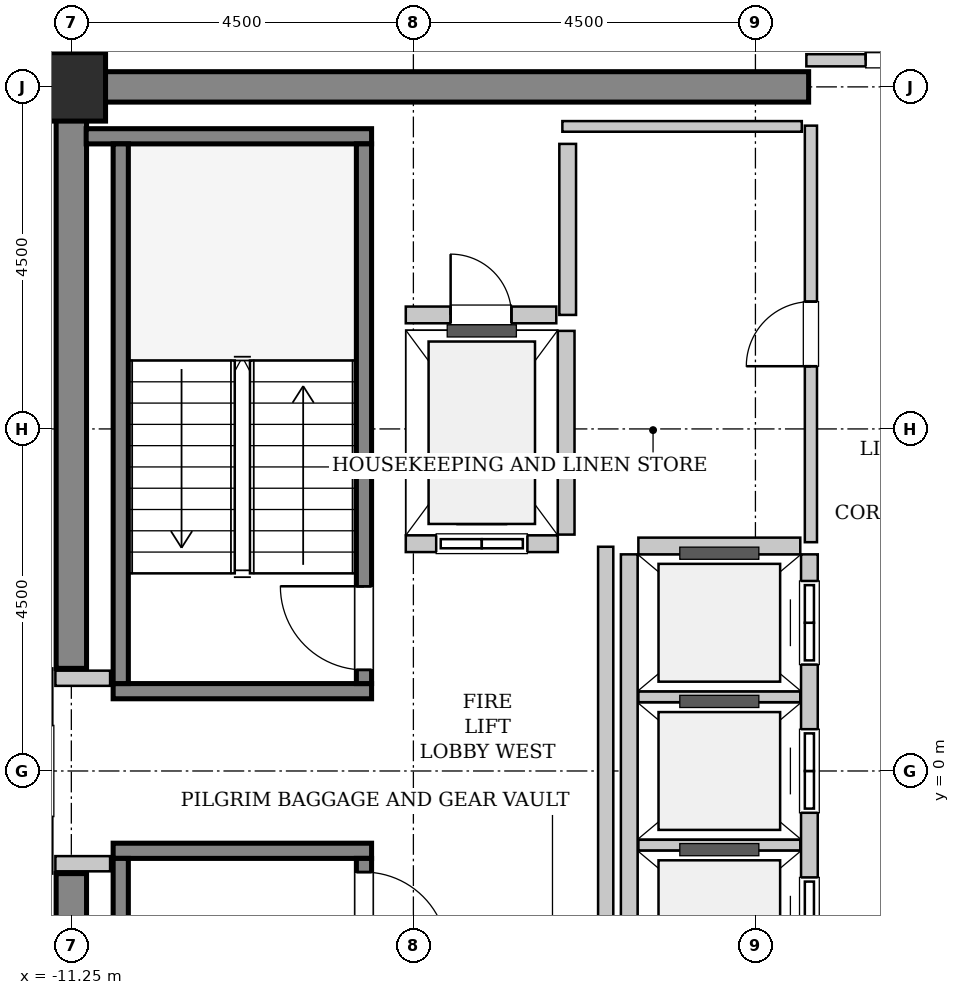
"""IFC4 building model, lengths in metres.
Left out: names, types, materials, properties, quantities, classifications, styles, units other than length and angle.
Written with IfcOpenShell. Run it as: python <this file> out.ifc"""

import sys

from ifc_helpers import new_model, si_unit, direction, frame, frame_2d, origin, origin_2d, place, context, subcontext, project, spatial, rectangle, extrude, source, transform, mapped, element, fill, save


model = new_model("IFC4")
c1 = context("Model", 3, precision=1e-05, world=origin(), true_north=direction((0.0, 1.0)))
c2 = subcontext(c1, "Body", "Model", "MODEL_VIEW")
j1 = project(units=[si_unit("LENGTHUNIT", "METRE"), si_unit("PLANEANGLEUNIT", "RADIAN")], contexts=[c1])
p1 = place(None, origin())
s1 = spatial("IfcSite", under=j1, at=p1, CompositionType="ELEMENT")
p2 = place(p1, origin())
s2 = spatial("IfcBuilding", under=s1, at=p2, CompositionType="ELEMENT")
p3 = place(p2, frame((0.0, 0.0, 341.4)))
s3 = spatial("IfcBuildingStorey", under=s2, at=p3, CompositionType="ELEMENT", Elevation=341.4)
m1 = source(origin(), c2, "Body", "SweptSolid", [
    extrude(rectangle(XDim=9.9, YDim=0.4, at=frame_2d((4.95, 0.0))), origin(), (0.0, 0.0, 1.0), 3.8),
])
p4 = place(p3, frame((-11.45, 9.0, 0.0), z_axis=(0.0, 0.0, 1.0), x_axis=(1.0, 0.0, 0.0)))
e1 = element("IfcWall", 1, at=p4, inside=s3, PredefinedType="SHEAR", context=c2, shape_type="MappedRepresentation", body=[
    mapped(m1, transform((0.0, 0.0, 0.0), x_axis=(1.0, 0.0, 0.0), y_axis=(0.0, 1.0, 0.0), z_axis=(0.0, 0.0, 1.0), scale=1.0)),
])
m2 = source(origin(), c2, "Body", "SweptSolid", [
    extrude(rectangle(XDim=7.45, YDim=0.4, at=frame_2d((3.725, 0.0))), origin(), (0.0, 0.0, 1.0), 3.8),
])
for number, where, z_axis, x_axis in (
    (2, (-11.25, -8.8, 0.0), (0.0, 0.0, 1.0), (0.0, 1.0, 0.0)),
    (3, (-11.25, 1.35, 0.0), (0.0, 0.0, 1.0), (0.0, 1.0, 0.0)),
):
    element("IfcWall", number, at=place(p3, frame(where, z_axis=z_axis, x_axis=x_axis)), inside=s3, PredefinedType="SHEAR", context=c2, shape_type="MappedRepresentation", body=[
        mapped(m2, transform((0.0, 0.0, 0.0), x_axis=(1.0, 0.0, 0.0), y_axis=(0.0, 1.0, 0.0), z_axis=(0.0, 0.0, 1.0), scale=1.0)),
    ])
m3 = source(origin(), c2, "Body", "SweptSolid", [
    extrude(rectangle(XDim=0.9, YDim=0.9, at=origin_2d()), origin(), (0.0, 0.0, 1.0), 3.8),
])
p5 = place(p3, frame((-11.25, 9.0, 0.0), z_axis=(0.0, 0.0, 1.0), x_axis=(1.0, 0.0, 0.0)))
e4 = element("IfcColumn", 4, at=p5, inside=s3, PredefinedType="COLUMN", context=c2, shape_type="MappedRepresentation", body=[
    mapped(m3, transform((0.0, 0.0, 0.0), x_axis=(1.0, 0.0, 0.0), y_axis=(0.0, 1.0, 0.0), z_axis=(0.0, 0.0, 1.0), scale=1.0)),
])
m4 = source(origin(), c2, "Body", "SweptSolid", [
    extrude(rectangle(XDim=3.4, YDim=0.2, at=frame_2d((1.7, 0.0))), origin(), (0.0, 0.0, 1.0), 3.8),
])
p6 = place(p3, frame((-7.3, 1.05, 0.0), z_axis=(0.0, 0.0, 1.0), x_axis=(-1.0, 0.0, 0.0)))
e5 = element("IfcWall", 5, at=p6, inside=s3, PredefinedType="SOLIDWALL", context=c2, shape_type="MappedRepresentation", body=[
    mapped(m4, transform((0.0, 0.0, 0.0), x_axis=(1.0, 0.0, 0.0), y_axis=(0.0, 1.0, 0.0), z_axis=(0.0, 0.0, 1.0), scale=1.0)),
])
m5 = source(origin(), c2, "Body", "SweptSolid", [
    extrude(rectangle(XDim=3.755, YDim=0.2, at=frame_2d((1.877, 0.0))), origin(), (0.0, 0.0, 1.0), 3.8),
])
p7 = place(p3, frame((-7.3, 8.35, 0.0), z_axis=(0.0, 0.0, 1.0), x_axis=(-1.0, 0.0, 0.0)))
e6 = element("IfcWall", 6, at=p7, inside=s3, PredefinedType="SOLIDWALL", context=c2, shape_type="MappedRepresentation", body=[
    mapped(m5, transform((0.0, 0.0, 0.0), x_axis=(1.0, 0.0, 0.0), y_axis=(0.0, 1.0, 0.0), z_axis=(0.0, 0.0, 1.0), scale=1.0)),
])
m6 = source(origin(), c2, "Body", "SweptSolid", [
    extrude(rectangle(XDim=7.1, YDim=0.2, at=frame_2d((3.55, 0.0))), origin(), (0.0, 0.0, 1.0), 3.8),
])
p8 = place(p3, frame((-7.4, 1.15, 0.0), z_axis=(0.0, 0.0, 1.0), x_axis=(0.0, 1.0, 0.0)))
e7 = element("IfcWall", 7, at=p8, inside=s3, PredefinedType="SOLIDWALL", context=c2, shape_type="MappedRepresentation", body=[
    mapped(m6, transform((0.0, 0.0, 0.0), x_axis=(1.0, 0.0, 0.0), y_axis=(0.0, 1.0, 0.0), z_axis=(0.0, 0.0, 1.0), scale=1.0)),
])
p9 = place(p8, frame((0.18, 0.0, 0.0)))
e8 = element("IfcOpeningElement", 8, at=p9, cuts=e7, PredefinedType="OPENING", context=c2, shape_type="SweptSolid", body=[
    extrude(rectangle(XDim=1.1, YDim=2.15, at=frame_2d((0.55, 1.075))), frame((0.0, 0.11, 0.0), z_axis=(0.0, -1.0, 0.0), x_axis=(1.0, 0.0, 0.0)), (0.0, 0.0, 1.0), 0.22),
])
p10 = place(p3, frame((-10.6, 1.15, 0.0), z_axis=(0.0, 0.0, 1.0), x_axis=(0.0, 1.0, 0.0)))
e9 = element("IfcWall", 9, at=p10, inside=s3, PredefinedType="SOLIDWALL", context=c2, shape_type="MappedRepresentation", body=[
    mapped(m6, transform((0.0, 0.0, 0.0), x_axis=(1.0, 0.0, 0.0), y_axis=(0.0, 1.0, 0.0), z_axis=(0.0, 0.0, 1.0), scale=1.0)),
])
p11 = place(p3, frame((-10.7, -1.05, 0.0), z_axis=(0.0, 0.0, 1.0), x_axis=(1.0, 0.0, 0.0)))
e10 = element("IfcWall", 10, at=p11, inside=s3, PredefinedType="SOLIDWALL", context=c2, shape_type="MappedRepresentation", body=[
    mapped(m4, transform((0.0, 0.0, 0.0), x_axis=(1.0, 0.0, 0.0), y_axis=(0.0, 1.0, 0.0), z_axis=(0.0, 0.0, 1.0), scale=1.0)),
])
p12 = place(p3, frame((-10.6, -1.15, 0.0), z_axis=(0.0, 0.0, 1.0), x_axis=(0.0, -1.0, 0.0)))
e11 = element("IfcWall", 11, at=p12, inside=s3, PredefinedType="SOLIDWALL", context=c2, shape_type="MappedRepresentation", body=[
    mapped(m6, transform((0.0, 0.0, 0.0), x_axis=(1.0, 0.0, 0.0), y_axis=(0.0, 1.0, 0.0), z_axis=(0.0, 0.0, 1.0), scale=1.0)),
])
p13 = place(p3, frame((-7.4, -1.15, 0.0), z_axis=(0.0, 0.0, 1.0), x_axis=(0.0, -1.0, 0.0)))
e12 = element("IfcWall", 12, at=p13, inside=s3, PredefinedType="SOLIDWALL", context=c2, shape_type="MappedRepresentation", body=[
    mapped(m6, transform((0.0, 0.0, 0.0), x_axis=(1.0, 0.0, 0.0), y_axis=(0.0, 1.0, 0.0), z_axis=(0.0, 0.0, 1.0), scale=1.0)),
])
p14 = place(p13, frame((0.18, 0.0, 0.0)))
e13 = element("IfcOpeningElement", 13, at=p14, cuts=e12, PredefinedType="OPENING", context=c2, shape_type="SweptSolid", body=[
    extrude(rectangle(XDim=1.1, YDim=2.15, at=frame_2d((0.55, 1.075))), frame((0.0, 0.11, 0.0), z_axis=(0.0, -1.0, 0.0), x_axis=(1.0, 0.0, 0.0)), (0.0, 0.0, 1.0), 0.22),
])
m7 = source(origin(), c2, "Body", "SweptSolid", [
    extrude(rectangle(XDim=2.0, YDim=0.22, at=frame_2d((1.0, 0.0))), origin(), (0.0, 0.0, 1.0), 3.535),
])
p15 = place(p3, frame((-6.85, 2.99, 0.0), z_axis=(0.0, 0.0, 1.0), x_axis=(1.0, 0.0, 0.0)))
e14 = element("IfcWall", 14, at=p15, inside=s3, PredefinedType="SOLIDWALL", context=c2, shape_type="MappedRepresentation", body=[
    mapped(m7, transform((0.0, 0.0, 0.0), x_axis=(1.0, 0.0, 0.0), y_axis=(0.0, 1.0, 0.0), z_axis=(0.0, 0.0, 1.0), scale=1.0)),
])
p16 = place(p15, frame((0.4, 0.0, 0.0)))
e15 = element("IfcOpeningElement", 15, at=p16, cuts=e14, PredefinedType="OPENING", context=c2, shape_type="SweptSolid", body=[
    extrude(rectangle(XDim=1.2, YDim=2.2, at=frame_2d((0.6, 1.1))), frame((0.0, 0.12, 0.0), z_axis=(0.0, -1.0, 0.0), x_axis=(1.0, 0.0, 0.0)), (0.0, 0.0, 1.0), 0.24),
])
m8 = source(origin(), c2, "Body", "SweptSolid", [
    extrude(rectangle(XDim=2.68, YDim=0.22, at=frame_2d((1.34, 0.0))), origin(), (0.0, 0.0, 1.0), 3.535),
])
p17 = place(p3, frame((-4.74, 3.11, 0.0), z_axis=(0.0, 0.0, 1.0), x_axis=(0.0, 1.0, 0.0)))
e16 = element("IfcWall", 16, at=p17, inside=s3, PredefinedType="SOLIDWALL", context=c2, shape_type="MappedRepresentation", body=[
    mapped(m8, transform((0.0, 0.0, 0.0), x_axis=(1.0, 0.0, 0.0), y_axis=(0.0, 1.0, 0.0), z_axis=(0.0, 0.0, 1.0), scale=1.0)),
])
m9 = source(origin(), c2, "Body", "SweptSolid", [
    extrude(rectangle(XDim=5.7, YDim=0.22, at=frame_2d((2.85, 0.0))), origin(), (0.0, 0.0, 1.0), 3.535),
])
p18 = place(p3, frame((-1.54, -2.85, 0.0), z_axis=(0.0, 0.0, 1.0), x_axis=(0.0, 1.0, 0.0)))
e17 = element("IfcWall", 17, at=p18, inside=s3, PredefinedType="SOLIDWALL", context=c2, shape_type="MappedRepresentation", body=[
    mapped(m9, transform((0.0, 0.0, 0.0), x_axis=(1.0, 0.0, 0.0), y_axis=(0.0, 1.0, 0.0), z_axis=(0.0, 0.0, 1.0), scale=1.0)),
])
p19 = place(p18, frame((0.35, 0.0, 0.0)))
e18 = element("IfcOpeningElement", 18, at=p19, cuts=e17, PredefinedType="OPENING", context=c2, shape_type="SweptSolid", body=[
    extrude(rectangle(XDim=1.1, YDim=2.2, at=frame_2d((0.55, 1.1))), frame((0.0, 0.12, 0.0), z_axis=(0.0, -1.0, 0.0), x_axis=(1.0, 0.0, 0.0)), (0.0, 0.0, 1.0), 0.24),
])
p20 = place(p18, frame((2.3, 0.0, 0.0)))
e19 = element("IfcOpeningElement", 19, at=p20, cuts=e17, PredefinedType="OPENING", context=c2, shape_type="SweptSolid", body=[
    extrude(rectangle(XDim=1.1, YDim=2.2, at=frame_2d((0.55, 1.1))), frame((0.0, 0.12, 0.0), z_axis=(0.0, -1.0, 0.0), x_axis=(1.0, 0.0, 0.0)), (0.0, 0.0, 1.0), 0.24),
])
p21 = place(p18, frame((4.25, 0.0, 0.0)))
e20 = element("IfcOpeningElement", 20, at=p21, cuts=e17, PredefinedType="OPENING", context=c2, shape_type="SweptSolid", body=[
    extrude(rectangle(XDim=1.1, YDim=2.2, at=frame_2d((0.55, 1.1))), frame((0.0, 0.12, 0.0), z_axis=(0.0, -1.0, 0.0), x_axis=(1.0, 0.0, 0.0)), (0.0, 0.0, 1.0), 0.24),
])
p22 = place(p3, frame((-3.91, 2.85, 0.0), z_axis=(0.0, 0.0, 1.0), x_axis=(0.0, -1.0, 0.0)))
e21 = element("IfcWall", 21, at=p22, inside=s3, PredefinedType="SOLIDWALL", context=c2, shape_type="MappedRepresentation", body=[
    mapped(m9, transform((0.0, 0.0, 0.0), x_axis=(1.0, 0.0, 0.0), y_axis=(0.0, 1.0, 0.0), z_axis=(0.0, 0.0, 1.0), scale=1.0)),
])
m10 = source(origin(), c2, "Body", "SweptSolid", [
    extrude(rectangle(XDim=2.13, YDim=0.14, at=frame_2d((1.065, 0.0))), origin(), (0.0, 0.0, 1.0), 3.535),
])
for number, where, z_axis, x_axis in (
    (22, (-3.79, -0.975, 0.0), (0.0, 0.0, 1.0), (1.0, 0.0, 0.0)),
    (23, (-3.79, 0.975, 0.0), (0.0, 0.0, 1.0), (1.0, 0.0, 0.0)),
):
    element("IfcWall", number, at=place(p3, frame(where, z_axis=z_axis, x_axis=x_axis)), inside=s3, PredefinedType="PARTITIONING", context=c2, shape_type="MappedRepresentation", body=[
        mapped(m10, transform((0.0, 0.0, 0.0), x_axis=(1.0, 0.0, 0.0), y_axis=(0.0, 1.0, 0.0), z_axis=(0.0, 0.0, 1.0), scale=1.0)),
    ])
m11 = source(origin(), c2, "Body", "SweptSolid", [
    extrude(rectangle(XDim=2.13, YDim=0.22, at=frame_2d((1.065, 0.0))), origin(), (0.0, 0.0, 1.0), 3.535),
])
p23 = place(p3, frame((-1.66, 2.96, 0.0), z_axis=(0.0, 0.0, 1.0), x_axis=(-1.0, 0.0, 0.0)))
e24 = element("IfcWall", 24, at=p23, inside=s3, PredefinedType="SOLIDWALL", context=c2, shape_type="MappedRepresentation", body=[
    mapped(m11, transform((0.0, 0.0, 0.0), x_axis=(1.0, 0.0, 0.0), y_axis=(0.0, 1.0, 0.0), z_axis=(0.0, 0.0, 1.0), scale=1.0)),
])
m12 = source(origin(), c2, "Body", "SweptSolid", [
    extrude(rectangle(XDim=2.25, YDim=0.22, at=frame_2d((1.125, 0.0))), origin(), (0.0, 0.0, 1.0), 3.535),
])
p24 = place(p3, frame((-4.72, 6.0, 0.0), z_axis=(0.0, 0.0, 1.0), x_axis=(0.0, 1.0, 0.0)))
e25 = element("IfcWall", 25, at=p24, inside=s3, PredefinedType="SOLIDWALL", context=c2, shape_type="MappedRepresentation", body=[
    mapped(m12, transform((0.0, 0.0, 0.0), x_axis=(1.0, 0.0, 0.0), y_axis=(0.0, 1.0, 0.0), z_axis=(0.0, 0.0, 1.0), scale=1.0)),
])
m13 = source(origin(), c2, "Body", "SweptSolid", [
    extrude(rectangle(XDim=1.98, YDim=0.22, at=frame_2d((0.99, 0.0))), origin(), (0.0, 0.0, 1.0), 3.535),
])
p25 = place(p3, frame((-6.85, 6.0, 0.0), z_axis=(0.0, 0.0, 1.0), x_axis=(1.0, 0.0, 0.0)))
e26 = element("IfcWall", 26, at=p25, inside=s3, PredefinedType="SOLIDWALL", context=c2, shape_type="MappedRepresentation", body=[
    mapped(m13, transform((0.0, 0.0, 0.0), x_axis=(1.0, 0.0, 0.0), y_axis=(0.0, 1.0, 0.0), z_axis=(0.0, 0.0, 1.0), scale=1.0)),
])
p26 = place(p25, frame((0.59, 0.0, 0.0)))
e27 = element("IfcOpeningElement", 27, at=p26, cuts=e26, PredefinedType="OPENING", context=c2, shape_type="SweptSolid", body=[
    extrude(rectangle(XDim=0.8, YDim=2.0, at=frame_2d((0.4, 1.0))), frame((0.0, 0.12, 0.0), z_axis=(0.0, -1.0, 0.0), x_axis=(1.0, 0.0, 0.0)), (0.0, 0.0, 1.0), 0.24),
])
m14 = source(origin(), c2, "Body", "SweptSolid", [
    extrude(rectangle(XDim=5.9, YDim=0.2, at=frame_2d((2.95, 0.0))), origin(), (0.0, 0.0, 1.0), 3.535),
])
p27 = place(p3, frame((-4.22, -2.95, 0.0), z_axis=(0.0, 0.0, 1.0), x_axis=(0.0, 1.0, 0.0)))
e28 = element("IfcWall", 28, at=p27, inside=s3, PredefinedType="PARTITIONING", context=c2, shape_type="MappedRepresentation", body=[
    mapped(m14, transform((0.0, 0.0, 0.0), x_axis=(1.0, 0.0, 0.0), y_axis=(0.0, 1.0, 0.0), z_axis=(0.0, 0.0, 1.0), scale=1.0)),
])
m15 = source(origin(), c2, "Body", "SweptSolid", [
    extrude(rectangle(XDim=0.72, YDim=0.2, at=frame_2d((0.36, 0.0))), origin(), (0.0, 0.0, 1.0), 3.535),
])
for number, where, z_axis, x_axis in (
    (29, (-11.46, 1.22, 0.0), (0.0, 0.0, 1.0), (1.0, 0.0, 0.0)),
    (30, (-11.46, -1.22, 0.0), (0.0, 0.0, 1.0), (1.0, 0.0, 0.0)),
):
    element("IfcWall", number, at=place(p3, frame(where, z_axis=z_axis, x_axis=x_axis)), inside=s3, PredefinedType="PARTITIONING", context=c2, shape_type="MappedRepresentation", body=[
        mapped(m15, transform((0.0, 0.0, 0.0), x_axis=(1.0, 0.0, 0.0), y_axis=(0.0, 1.0, 0.0), z_axis=(0.0, 0.0, 1.0), scale=1.0)),
    ])
m16 = source(origin(), c2, "Body", "SweptSolid", [
    extrude(rectangle(XDim=3.16, YDim=0.16, at=frame_2d((1.58, 0.0))), origin(), (0.0, 0.0, 1.0), 2.625),
])
p28 = place(p3, frame((-1.58, 9.35, 0.0), z_axis=(0.0, 0.0, 1.0), x_axis=(1.0, 0.0, 0.0)))
e31 = element("IfcWall", 31, at=p28, inside=s3, PredefinedType="PARTITIONING", context=c2, shape_type="MappedRepresentation", body=[
    mapped(m16, transform((0.0, 0.0, 0.0), x_axis=(1.0, 0.0, 0.0), y_axis=(0.0, 1.0, 0.0), z_axis=(0.0, 0.0, 1.0), scale=1.0)),
])
p29 = place(p28, frame((0.78, 0.0, 0.0)))
e32 = element("IfcOpeningElement", 32, at=p29, cuts=e31, PredefinedType="OPENING", context=c2, shape_type="SweptSolid", body=[
    extrude(rectangle(XDim=1.6, YDim=2.3, at=frame_2d((0.8, 1.15))), frame((0.0, 0.09, 0.0), z_axis=(0.0, -1.0, 0.0), x_axis=(1.0, 0.0, 0.0)), (0.0, 0.0, 1.0), 0.18),
])
m17 = source(origin(), c2, "Body", "SweptSolid", [
    extrude(rectangle(XDim=5.48, YDim=0.16, at=frame_2d((2.74, 0.0))), origin(), (0.0, 0.0, 1.0), 3.535),
])
p30 = place(p3, frame((-1.52, 3.01, 0.0), z_axis=(0.0, 0.0, 1.0), x_axis=(0.0, 1.0, 0.0)))
e33 = element("IfcWall", 33, at=p30, inside=s3, PredefinedType="PARTITIONING", context=c2, shape_type="MappedRepresentation", body=[
    mapped(m17, transform((0.0, 0.0, 0.0), x_axis=(1.0, 0.0, 0.0), y_axis=(0.0, 1.0, 0.0), z_axis=(0.0, 0.0, 1.0), scale=1.0)),
])
p31 = place(p30, frame((2.315, 0.0, 0.0)))
e34 = element("IfcOpeningElement", 34, at=p31, cuts=e33, PredefinedType="OPENING", context=c2, shape_type="SweptSolid", body=[
    extrude(rectangle(XDim=0.85, YDim=2.1, at=frame_2d((0.425, 1.05))), frame((0.0, 0.09, 0.0), z_axis=(0.0, -1.0, 0.0), x_axis=(1.0, 0.0, 0.0)), (0.0, 0.0, 1.0), 0.18),
])
m18 = source(origin(), c2, "Body", "SweptSolid", [
    extrude(rectangle(XDim=3.15, YDim=0.14, at=frame_2d((1.575, 0.0))), origin(), (0.0, 0.0, 1.0), 3.535),
])
p32 = place(p3, frame((-4.79, 8.48, 0.0), z_axis=(0.0, 0.0, 1.0), x_axis=(1.0, 0.0, 0.0)))
e35 = element("IfcWall", 35, at=p32, inside=s3, PredefinedType="PARTITIONING", context=c2, shape_type="MappedRepresentation", body=[
    mapped(m18, transform((0.0, 0.0, 0.0), x_axis=(1.0, 0.0, 0.0), y_axis=(0.0, 1.0, 0.0), z_axis=(0.0, 0.0, 1.0), scale=1.0)),
])
m19 = source(origin(), c2, "Body", "SweptSolid", [
    extrude(rectangle(XDim=1.1, YDim=2.15, at=frame_2d((0.55, 1.075))), frame((0.0, 0.025, 0.0), z_axis=(0.0, -1.0, 0.0), x_axis=(1.0, 0.0, 0.0)), (0.0, 0.0, 1.0), 0.05),
])
p33 = place(p9, origin())
e36 = element("IfcDoor", 36, at=p33, inside=s3, OperationType="SINGLE_SWING_RIGHT", PredefinedType="DOOR", context=c2, shape_type="MappedRepresentation", body=[
    mapped(m19, transform((0.0, 0.0, 0.0), x_axis=(1.0, 0.0, 0.0), y_axis=(0.0, 1.0, 0.0), z_axis=(0.0, 0.0, 1.0), scale=1.0)),
])
fill(e8, e36)
p34 = place(p14, origin())
e37 = element("IfcDoor", 37, at=p34, inside=s3, OperationType="SINGLE_SWING_RIGHT", PredefinedType="DOOR", context=c2, shape_type="MappedRepresentation", body=[
    mapped(m19, transform((0.0, 0.0, 0.0), x_axis=(1.0, 0.0, 0.0), y_axis=(0.0, 1.0, 0.0), z_axis=(0.0, 0.0, 1.0), scale=1.0)),
])
fill(e13, e37)
m20 = source(origin(), c2, "Body", "SweptSolid", [
    extrude(rectangle(XDim=1.2, YDim=2.2, at=frame_2d((0.6, 1.1))), frame((0.0, 0.025, 0.0), z_axis=(0.0, -1.0, 0.0), x_axis=(1.0, 0.0, 0.0)), (0.0, 0.0, 1.0), 0.05),
])
p35 = place(p16, origin())
e38 = element("IfcDoor", 38, at=p35, inside=s3, OperationType="SLIDING_TO_LEFT", PredefinedType="DOOR", context=c2, shape_type="MappedRepresentation", body=[
    mapped(m20, transform((0.0, 0.0, 0.0), x_axis=(1.0, 0.0, 0.0), y_axis=(0.0, 1.0, 0.0), z_axis=(0.0, 0.0, 1.0), scale=1.0)),
])
fill(e15, e38)
m21 = source(origin(), c2, "Body", "SweptSolid", [
    extrude(rectangle(XDim=1.1, YDim=2.2, at=frame_2d((0.55, 1.1))), frame((0.0, 0.025, 0.0), z_axis=(0.0, -1.0, 0.0), x_axis=(1.0, 0.0, 0.0)), (0.0, 0.0, 1.0), 0.05),
])
p36 = place(p19, origin())
e39 = element("IfcDoor", 39, at=p36, inside=s3, OperationType="DOUBLE_DOOR_SLIDING", PredefinedType="DOOR", context=c2, shape_type="MappedRepresentation", body=[
    mapped(m21, transform((0.0, 0.0, 0.0), x_axis=(1.0, 0.0, 0.0), y_axis=(0.0, 1.0, 0.0), z_axis=(0.0, 0.0, 1.0), scale=1.0)),
])
fill(e18, e39)
p37 = place(p20, origin())
e40 = element("IfcDoor", 40, at=p37, inside=s3, OperationType="DOUBLE_DOOR_SLIDING", PredefinedType="DOOR", context=c2, shape_type="MappedRepresentation", body=[
    mapped(m21, transform((0.0, 0.0, 0.0), x_axis=(1.0, 0.0, 0.0), y_axis=(0.0, 1.0, 0.0), z_axis=(0.0, 0.0, 1.0), scale=1.0)),
])
fill(e19, e40)
p38 = place(p21, origin())
e41 = element("IfcDoor", 41, at=p38, inside=s3, OperationType="DOUBLE_DOOR_SLIDING", PredefinedType="DOOR", context=c2, shape_type="MappedRepresentation", body=[
    mapped(m21, transform((0.0, 0.0, 0.0), x_axis=(1.0, 0.0, 0.0), y_axis=(0.0, 1.0, 0.0), z_axis=(0.0, 0.0, 1.0), scale=1.0)),
])
fill(e20, e41)
m22 = source(origin(), c2, "Body", "SweptSolid", [
    extrude(rectangle(XDim=0.8, YDim=2.0, at=frame_2d((0.4, 1.0))), frame((0.0, 0.025, 0.0), z_axis=(0.0, -1.0, 0.0), x_axis=(1.0, 0.0, 0.0)), (0.0, 0.0, 1.0), 0.05),
])
p39 = place(p26, origin())
e42 = element("IfcDoor", 42, at=p39, inside=s3, OperationType="SINGLE_SWING_LEFT", PredefinedType="TRAPDOOR", context=c2, shape_type="MappedRepresentation", body=[
    mapped(m22, transform((0.0, 0.0, 0.0), x_axis=(1.0, 0.0, 0.0), y_axis=(0.0, 1.0, 0.0), z_axis=(0.0, 0.0, 1.0), scale=1.0)),
])
fill(e27, e42)
m23 = source(origin(), c2, "Body", "SweptSolid", [
    extrude(rectangle(XDim=1.6, YDim=2.3, at=frame_2d((0.8, 1.15))), frame((0.0, 0.025, 0.0), z_axis=(0.0, -1.0, 0.0), x_axis=(1.0, 0.0, 0.0)), (0.0, 0.0, 1.0), 0.05),
])
p40 = place(p29, origin())
e43 = element("IfcDoor", 43, at=p40, inside=s3, OperationType="DOUBLE_DOOR_SINGLE_SWING", PredefinedType="DOOR", context=c2, shape_type="MappedRepresentation", body=[
    mapped(m23, transform((0.0, 0.0, 0.0), x_axis=(1.0, 0.0, 0.0), y_axis=(0.0, 1.0, 0.0), z_axis=(0.0, 0.0, 1.0), scale=1.0)),
])
fill(e32, e43)
m24 = source(origin(), c2, "Body", "SweptSolid", [
    extrude(rectangle(XDim=0.85, YDim=2.1, at=frame_2d((0.425, 1.05))), frame((0.0, 0.025, 0.0), z_axis=(0.0, -1.0, 0.0), x_axis=(1.0, 0.0, 0.0)), (0.0, 0.0, 1.0), 0.05),
])
p41 = place(p31, origin())
e44 = element("IfcDoor", 44, at=p41, inside=s3, OperationType="SINGLE_SWING_LEFT", PredefinedType="DOOR", context=c2, shape_type="MappedRepresentation", body=[
    mapped(m24, transform((0.0, 0.0, 0.0), x_axis=(1.0, 0.0, 0.0), y_axis=(0.0, 1.0, 0.0), z_axis=(0.0, 0.0, 1.0), scale=1.0)),
])
fill(e34, e44)
save(model, sys.argv[1])
